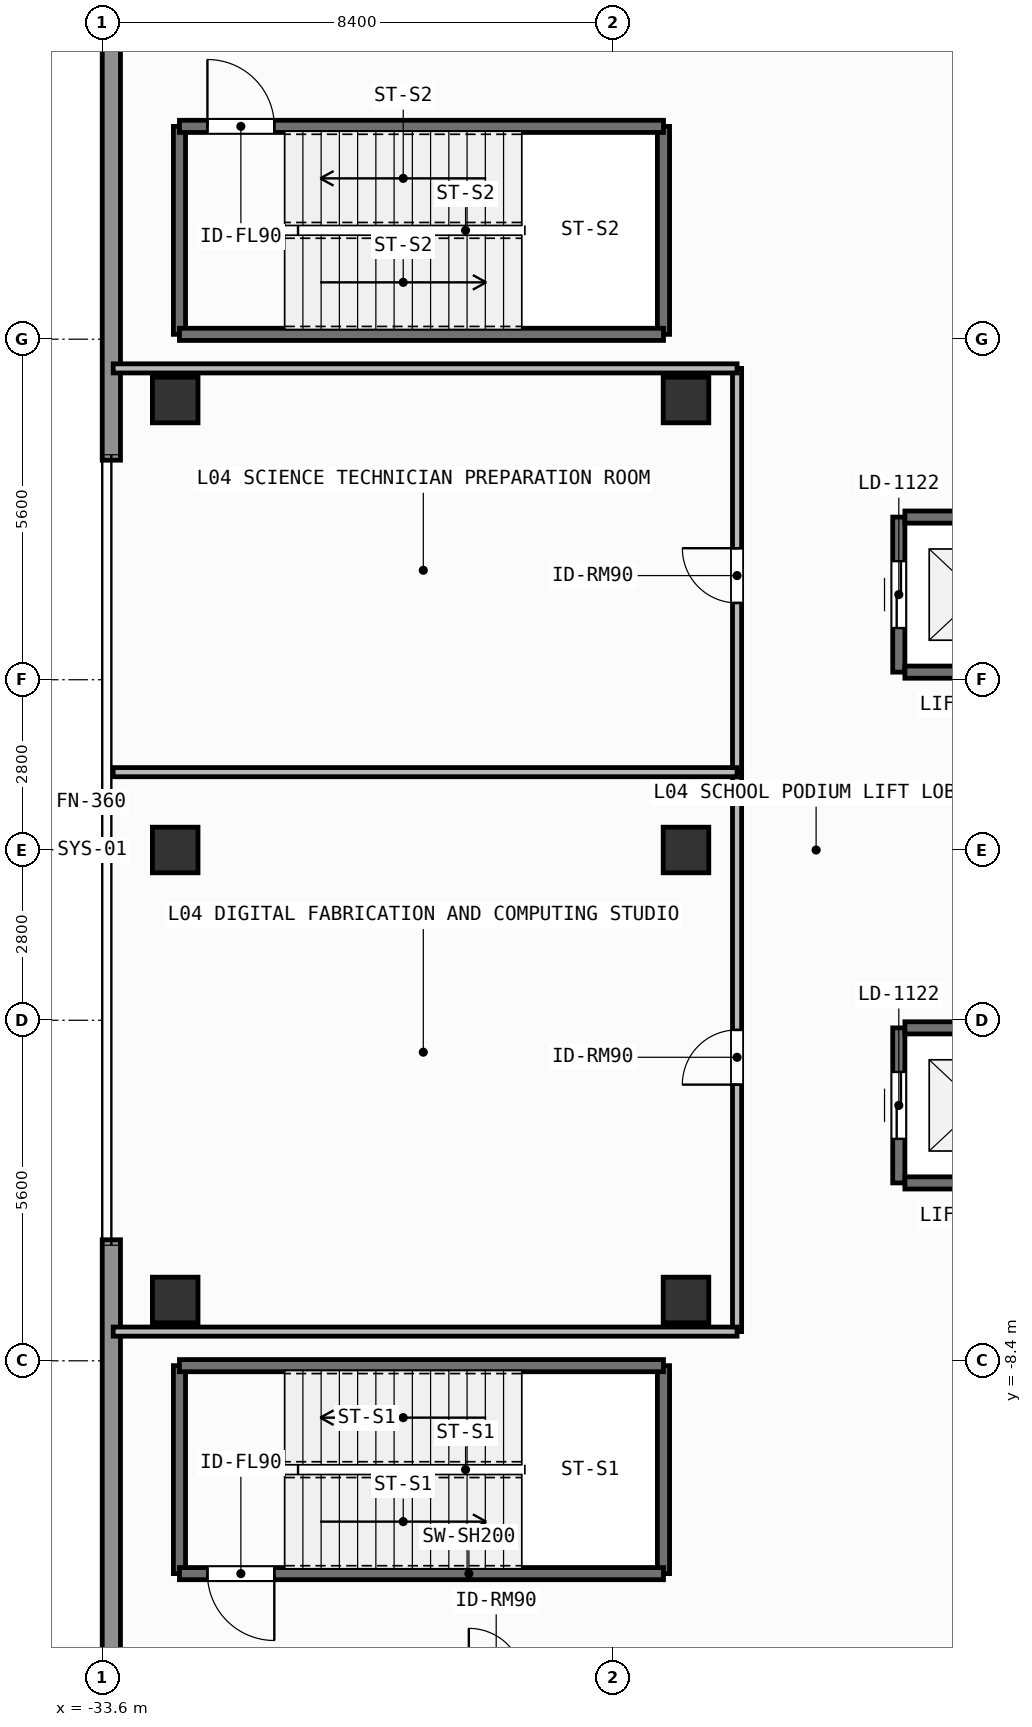
"""IFC4 building model, lengths in metres.
Left out: names, types, materials, properties, quantities, classifications, styles, units other than length and angle.
Written with IfcOpenShell. Run it as: python <this file> out.ifc"""

import sys

from ifc_helpers import new_model, si_unit, direction, frame, frame_2d, origin, origin_2d, place, context, subcontext, project, spatial, rectangle, extrude, element, fill, save


model = new_model("IFC4")
c1 = context("Model", 3, precision=1e-05, world=origin(), true_north=direction((0.0, 1.0)))
c2 = subcontext(c1, "Body", "Model", "MODEL_VIEW")
j1 = project(units=[si_unit("LENGTHUNIT", "METRE"), si_unit("PLANEANGLEUNIT", "RADIAN")], contexts=[c1])
p1 = place(None, origin())
s1 = spatial("IfcSite", under=j1, at=p1, CompositionType="ELEMENT")
p2 = place(p1, origin())
s2 = spatial("IfcBuilding", under=s1, at=p2, CompositionType="ELEMENT")
p3 = place(p2, frame((0.0, 0.0, 13.2)))
s3 = spatial("IfcBuildingStorey", under=s2, at=p3, CompositionType="ELEMENT", Elevation=13.2)
for number, where, z_axis, x_axis in (
    (1, (-32.4, -7.4, 0.0), (0.0, 0.0, 1.0), (1.0, 0.0, 0.0)),
    (2, (-32.4, 0.0, 0.0), (0.0, 0.0, 1.0), (1.0, 0.0, 0.0)),
    (3, (-32.4, 7.4, 0.0), (0.0, 0.0, 1.0), (1.0, 0.0, 0.0)),
    (4, (-24.0, -7.4, 0.0), (0.0, 0.0, 1.0), (1.0, 0.0, 0.0)),
    (5, (-24.0, 0.0, 0.0), (0.0, 0.0, 1.0), (1.0, 0.0, 0.0)),
    (6, (-24.0, 7.4, 0.0), (0.0, 0.0, 1.0), (1.0, 0.0, 0.0)),
):
    element("IfcColumn", number, at=place(p3, frame(where, z_axis=z_axis, x_axis=x_axis)), inside=s3, PredefinedType="COLUMN", context=c2, shape_type="SweptSolid", body=[
        extrude(rectangle(XDim=0.75, YDim=0.75, at=origin_2d()), origin(), (0.0, 0.0, 1.0), 4.2),
    ])
for number, where, z_axis, x_axis in (
    (7, (-33.45, -20.5, 0.0), (0.0, 0.0, 1.0), (0.0, 1.0, 0.0)),
    (8, (-33.45, 6.41, 0.0), (0.0, 0.0, 1.0), (0.0, 1.0, 0.0)),
):
    element("IfcWall", number, at=place(p3, frame(where, z_axis=z_axis, x_axis=x_axis)), inside=s3, PredefinedType="SOLIDWALL", context=c2, shape_type="SweptSolid", body=[
        extrude(rectangle(XDim=14.09, YDim=0.3, at=frame_2d((7.045, 0.0))), origin(), (0.0, 0.0, 1.0), 3.96),
    ])
p4 = place(p3, frame((-20.5, -5.475, 0.0), z_axis=(0.0, 0.0, 1.0), x_axis=(0.0, 1.0, 0.0)))
e9 = element("IfcWall", 9, at=p4, inside=s3, PredefinedType="SHEAR", context=c2, shape_type="SweptSolid", body=[
    extrude(rectangle(XDim=2.55, YDim=0.2, at=frame_2d((1.275, 0.0))), origin(), (0.0, 0.0, 1.0), 3.96),
])
p5 = place(p4, frame((0.725, 0.0, 0.0)))
e10 = element("IfcOpeningElement", 10, at=p5, cuts=e9, PredefinedType="OPENING", context=c2, shape_type="SweptSolid", body=[
    extrude(rectangle(XDim=1.1, YDim=2.2, at=frame_2d((0.55, 1.1))), frame((0.0, 0.11, 0.0), z_axis=(0.0, -1.0, 0.0), x_axis=(1.0, 0.0, 0.0)), (0.0, 0.0, 1.0), 0.22),
])
for number, where, z_axis, x_axis in (
    (11, (-20.4, -5.475, 0.0), (0.0, 0.0, 1.0), (1.0, 0.0, 0.0)),
    (12, (-20.4, -2.925, 0.0), (0.0, 0.0, 1.0), (1.0, 0.0, 0.0)),
):
    element("IfcWall", number, at=place(p3, frame(where, z_axis=z_axis, x_axis=x_axis)), inside=s3, PredefinedType="SHEAR", context=c2, shape_type="SweptSolid", body=[
        extrude(rectangle(XDim=2.4, YDim=0.2, at=frame_2d((1.2, 0.0))), origin(), (0.0, 0.0, 1.0), 3.96),
    ])
p6 = place(p3, frame((-20.5, 2.925, 0.0), z_axis=(0.0, 0.0, 1.0), x_axis=(0.0, 1.0, 0.0)))
e13 = element("IfcWall", 13, at=p6, inside=s3, PredefinedType="SHEAR", context=c2, shape_type="SweptSolid", body=[
    extrude(rectangle(XDim=2.55, YDim=0.2, at=frame_2d((1.275, 0.0))), origin(), (0.0, 0.0, 1.0), 3.96),
])
p7 = place(p6, frame((0.725, 0.0, 0.0)))
e14 = element("IfcOpeningElement", 14, at=p7, cuts=e13, PredefinedType="OPENING", context=c2, shape_type="SweptSolid", body=[
    extrude(rectangle(XDim=1.1, YDim=2.2, at=frame_2d((0.55, 1.1))), frame((0.0, 0.11, 0.0), z_axis=(0.0, -1.0, 0.0), x_axis=(1.0, 0.0, 0.0)), (0.0, 0.0, 1.0), 0.22),
])
for number, where, z_axis, x_axis in (
    (15, (-20.4, 2.925, 0.0), (0.0, 0.0, 1.0), (1.0, 0.0, 0.0)),
    (16, (-20.4, 5.475, 0.0), (0.0, 0.0, 1.0), (1.0, 0.0, 0.0)),
):
    element("IfcWall", number, at=place(p3, frame(where, z_axis=z_axis, x_axis=x_axis)), inside=s3, PredefinedType="SHEAR", context=c2, shape_type="SweptSolid", body=[
        extrude(rectangle(XDim=2.4, YDim=0.2, at=frame_2d((1.2, 0.0))), origin(), (0.0, 0.0, 1.0), 3.96),
    ])
for number, where, z_axis, x_axis in (
    (17, (-32.33, -11.9, 0.0), (0.0, 0.0, 1.0), (0.0, 1.0, 0.0)),
    (18, (-24.37, -8.48, 0.0), (0.0, 0.0, 1.0), (0.0, -1.0, 0.0)),
):
    element("IfcWall", number, at=place(p3, frame(where, z_axis=z_axis, x_axis=x_axis)), inside=s3, PredefinedType="SHEAR", context=c2, shape_type="SweptSolid", body=[
        extrude(rectangle(XDim=3.42, YDim=0.2, at=frame_2d((1.71, 0.0))), origin(), (0.0, 0.0, 1.0), 3.96),
    ])
p8 = place(p3, frame((-24.37, -11.9, 0.0), z_axis=(0.0, 0.0, 1.0), x_axis=(-1.0, 0.0, 0.0)))
e19 = element("IfcWall", 19, at=p8, inside=s3, PredefinedType="SHEAR", context=c2, shape_type="SweptSolid", body=[
    extrude(rectangle(XDim=7.96, YDim=0.2, at=frame_2d((3.98, 0.0))), origin(), (0.0, 0.0, 1.0), 3.96),
])
p9 = place(p8, frame((6.4, 0.0, 0.0)))
e20 = element("IfcOpeningElement", 20, at=p9, cuts=e19, PredefinedType="OPENING", context=c2, shape_type="SweptSolid", body=[
    extrude(rectangle(XDim=1.1, YDim=2.15, at=frame_2d((0.55, 1.075))), frame((0.0, 0.11, 0.0), z_axis=(0.0, -1.0, 0.0), x_axis=(1.0, 0.0, 0.0)), (0.0, 0.0, 1.0), 0.22),
])
p10 = place(p3, frame((-32.33, -8.48, 0.0), z_axis=(0.0, 0.0, 1.0), x_axis=(1.0, 0.0, 0.0)))
e21 = element("IfcWall", 21, at=p10, inside=s3, PredefinedType="SHEAR", context=c2, shape_type="SweptSolid", body=[
    extrude(rectangle(XDim=7.96, YDim=0.2, at=frame_2d((3.98, 0.0))), origin(), (0.0, 0.0, 1.0), 3.96),
])
for number, where, z_axis, x_axis in (
    (22, (-32.33, 8.48, 0.0), (0.0, 0.0, 1.0), (0.0, 1.0, 0.0)),
    (23, (-24.37, 11.9, 0.0), (0.0, 0.0, 1.0), (0.0, -1.0, 0.0)),
):
    element("IfcWall", number, at=place(p3, frame(where, z_axis=z_axis, x_axis=x_axis)), inside=s3, PredefinedType="SHEAR", context=c2, shape_type="SweptSolid", body=[
        extrude(rectangle(XDim=3.42, YDim=0.2, at=frame_2d((1.71, 0.0))), origin(), (0.0, 0.0, 1.0), 3.96),
    ])
p11 = place(p3, frame((-24.37, 8.48, 0.0), z_axis=(0.0, 0.0, 1.0), x_axis=(-1.0, 0.0, 0.0)))
e24 = element("IfcWall", 24, at=p11, inside=s3, PredefinedType="SHEAR", context=c2, shape_type="SweptSolid", body=[
    extrude(rectangle(XDim=7.96, YDim=0.2, at=frame_2d((3.98, 0.0))), origin(), (0.0, 0.0, 1.0), 3.96),
])
p12 = place(p3, frame((-32.33, 11.9, 0.0), z_axis=(0.0, 0.0, 1.0), x_axis=(1.0, 0.0, 0.0)))
e25 = element("IfcWall", 25, at=p12, inside=s3, PredefinedType="SHEAR", context=c2, shape_type="SweptSolid", body=[
    extrude(rectangle(XDim=7.96, YDim=0.2, at=frame_2d((3.98, 0.0))), origin(), (0.0, 0.0, 1.0), 3.96),
])
p13 = place(p12, frame((0.46, 0.0, 0.0)))
e26 = element("IfcOpeningElement", 26, at=p13, cuts=e25, PredefinedType="OPENING", context=c2, shape_type="SweptSolid", body=[
    extrude(rectangle(XDim=1.1, YDim=2.15, at=frame_2d((0.55, 1.075))), frame((0.0, 0.11, 0.0), z_axis=(0.0, -1.0, 0.0), x_axis=(1.0, 0.0, 0.0)), (0.0, 0.0, 1.0), 0.22),
])
p14 = place(p3, frame((-23.16, -7.92, 0.0), z_axis=(0.0, 0.0, 1.0), x_axis=(0.0, 1.0, 0.0)))
e27 = element("IfcWall", 27, at=p14, inside=s3, PredefinedType="PARTITIONING", context=c2, shape_type="SweptSolid", body=[
    extrude(rectangle(XDim=9.2, YDim=0.15, at=frame_2d((4.6, 0.0))), origin(), (0.0, 0.0, 1.0), 3.96),
])
p15 = place(p14, frame((4.061, 0.0, 0.0)))
e28 = element("IfcOpeningElement", 28, at=p15, cuts=e27, PredefinedType="OPENING", context=c2, shape_type="SweptSolid", body=[
    extrude(rectangle(XDim=0.9, YDim=2.1, at=frame_2d((0.45, 1.05))), frame((0.0, 0.085, 0.0), z_axis=(0.0, -1.0, 0.0), x_axis=(1.0, 0.0, 0.0)), (0.0, 0.0, 1.0), 0.17),
])
p16 = place(p3, frame((-23.16, 1.28, 0.0), z_axis=(0.0, 0.0, 1.0), x_axis=(0.0, 1.0, 0.0)))
e29 = element("IfcWall", 29, at=p16, inside=s3, PredefinedType="PARTITIONING", context=c2, shape_type="SweptSolid", body=[
    extrude(rectangle(XDim=6.64, YDim=0.15, at=frame_2d((3.32, 0.0))), origin(), (0.0, 0.0, 1.0), 3.96),
])
p17 = place(p16, frame((2.783, 0.0, 0.0)))
e30 = element("IfcOpeningElement", 30, at=p17, cuts=e29, PredefinedType="OPENING", context=c2, shape_type="SweptSolid", body=[
    extrude(rectangle(XDim=0.9, YDim=2.1, at=frame_2d((0.45, 1.05))), frame((0.0, 0.085, 0.0), z_axis=(0.0, -1.0, 0.0), x_axis=(1.0, 0.0, 0.0)), (0.0, 0.0, 1.0), 0.17),
])
for number, where, z_axis, x_axis in (
    (31, (-33.42, -7.92, 0.0), (0.0, 0.0, 1.0), (1.0, 0.0, 0.0)),
    (32, (-33.42, 7.92, 0.0), (0.0, 0.0, 1.0), (1.0, 0.0, 0.0)),
    (33, (-33.42, 1.28, 0.0), (0.0, 0.0, 1.0), (1.0, 0.0, 0.0)),
):
    element("IfcWall", number, at=place(p3, frame(where, z_axis=z_axis, x_axis=x_axis)), inside=s3, PredefinedType="PARTITIONING", context=c2, shape_type="SweptSolid", body=[
        extrude(rectangle(XDim=10.26, YDim=0.15, at=frame_2d((5.13, 0.0))), origin(), (0.0, 0.0, 1.0), 3.96),
    ])
p18 = place(p5, origin())
e34 = element("IfcDoor", 34, at=p18, inside=s3, OperationType="SLIDING_TO_LEFT", PredefinedType="DOOR", context=c2, shape_type="SweptSolid", body=[
    extrude(rectangle(XDim=1.1, YDim=2.2, at=frame_2d((0.55, 1.1))), frame((0.0, 0.025, 0.0), z_axis=(0.0, -1.0, 0.0), x_axis=(1.0, 0.0, 0.0)), (0.0, 0.0, 1.0), 0.05),
])
fill(e10, e34)
p19 = place(p7, origin())
e35 = element("IfcDoor", 35, at=p19, inside=s3, OperationType="SLIDING_TO_LEFT", PredefinedType="DOOR", context=c2, shape_type="SweptSolid", body=[
    extrude(rectangle(XDim=1.1, YDim=2.2, at=frame_2d((0.55, 1.1))), frame((0.0, 0.025, 0.0), z_axis=(0.0, -1.0, 0.0), x_axis=(1.0, 0.0, 0.0)), (0.0, 0.0, 1.0), 0.05),
])
fill(e14, e35)
p20 = place(p9, origin())
e36 = element("IfcDoor", 36, at=p20, inside=s3, OperationType="SINGLE_SWING_LEFT", PredefinedType="DOOR", context=c2, shape_type="SweptSolid", body=[
    extrude(rectangle(XDim=1.1, YDim=2.15, at=frame_2d((0.55, 1.075))), frame((0.0, 0.025, 0.0), z_axis=(0.0, -1.0, 0.0), x_axis=(1.0, 0.0, 0.0)), (0.0, 0.0, 1.0), 0.05),
])
fill(e20, e36)
p21 = place(p13, origin())
e37 = element("IfcDoor", 37, at=p21, inside=s3, OperationType="SINGLE_SWING_LEFT", PredefinedType="DOOR", context=c2, shape_type="SweptSolid", body=[
    extrude(rectangle(XDim=1.1, YDim=2.15, at=frame_2d((0.55, 1.075))), frame((0.0, 0.025, 0.0), z_axis=(0.0, -1.0, 0.0), x_axis=(1.0, 0.0, 0.0)), (0.0, 0.0, 1.0), 0.05),
])
fill(e26, e37)
p22 = place(p15, origin())
e38 = element("IfcDoor", 38, at=p22, inside=s3, OperationType="SINGLE_SWING_LEFT", PredefinedType="DOOR", context=c2, shape_type="SweptSolid", body=[
    extrude(rectangle(XDim=0.9, YDim=2.1, at=frame_2d((0.45, 1.05))), frame((0.0, 0.025, 0.0), z_axis=(0.0, -1.0, 0.0), x_axis=(1.0, 0.0, 0.0)), (0.0, 0.0, 1.0), 0.05),
])
fill(e28, e38)
p23 = place(p17, origin())
e39 = element("IfcDoor", 39, at=p23, inside=s3, OperationType="SINGLE_SWING_RIGHT", PredefinedType="DOOR", context=c2, shape_type="SweptSolid", body=[
    extrude(rectangle(XDim=0.9, YDim=2.1, at=frame_2d((0.45, 1.05))), frame((0.0, 0.025, 0.0), z_axis=(0.0, -1.0, 0.0), x_axis=(1.0, 0.0, 0.0)), (0.0, 0.0, 1.0), 0.05),
])
fill(e30, e39)
save(model, sys.argv[1])
